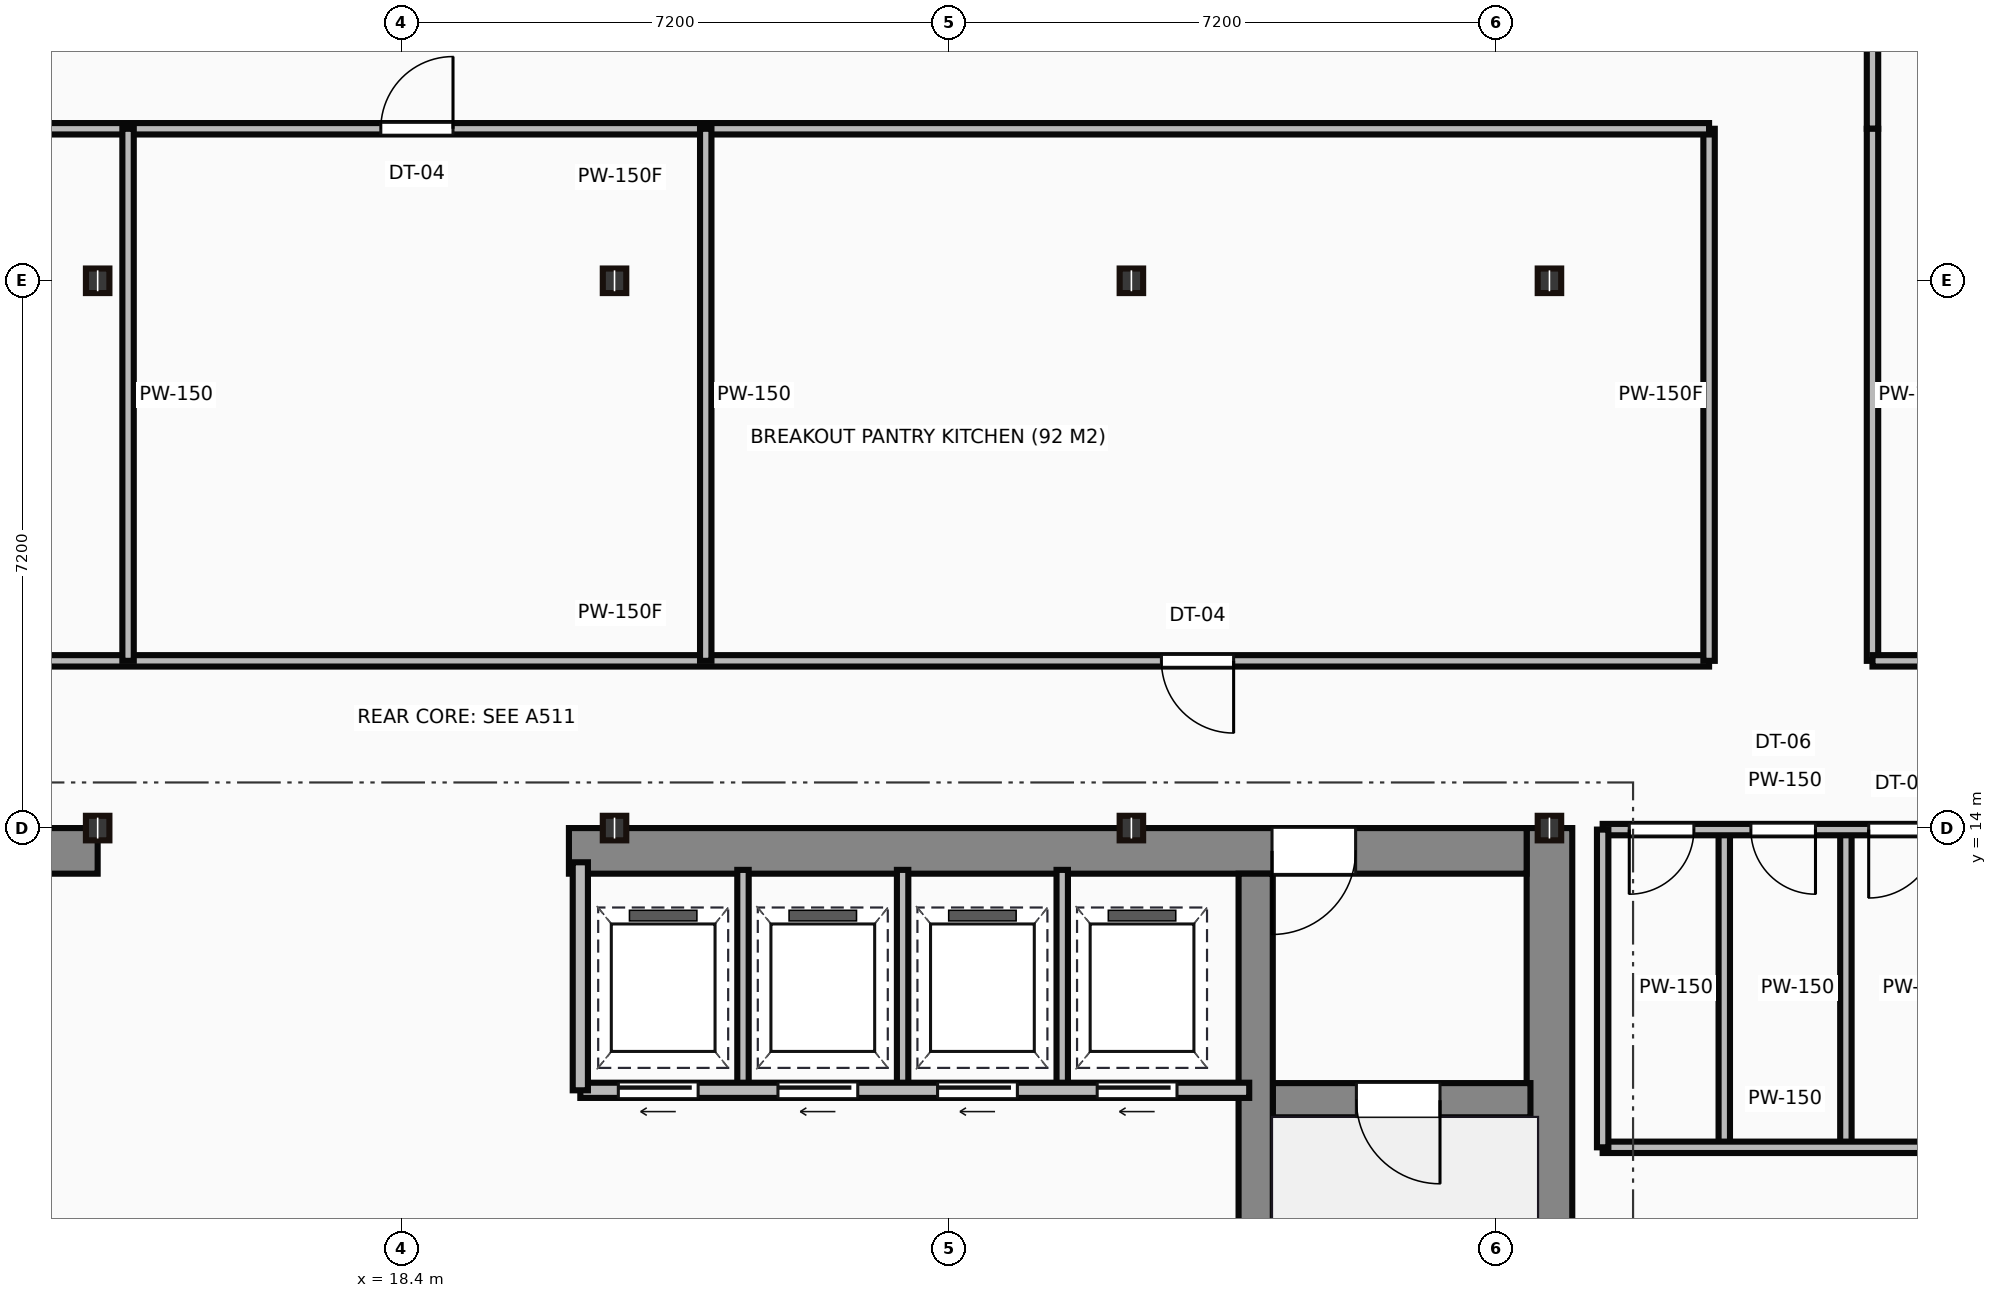
"""IFC4 building model, lengths in metres.
Left out: names, types, materials, properties, quantities, classifications, styles, units other than length and angle.
Written with IfcOpenShell. Run it as: python <this file> out.ifc"""

import sys

from ifc_helpers import new_model, si_unit, direction, frame, frame_2d, origin, origin_2d, place, context, subcontext, project, spatial, rectangle, i_section, extrude, source, transform, mapped, element, fill, save


model = new_model("IFC4")
c1 = context("Model", 3, precision=1e-05, world=origin(), true_north=direction((0.0, 1.0)))
c2 = subcontext(c1, "Body", "Model", "MODEL_VIEW")
j1 = project(units=[si_unit("LENGTHUNIT", "METRE"), si_unit("PLANEANGLEUNIT", "RADIAN")], contexts=[c1])
p1 = place(None, origin())
s1 = spatial("IfcSite", under=j1, at=p1, CompositionType="ELEMENT")
p2 = place(p1, origin())
s2 = spatial("IfcBuilding", under=s1, at=p2, CompositionType="ELEMENT")
p3 = place(p2, frame((0.0, 0.0, 273.4)))
s3 = spatial("IfcBuildingStorey", under=s2, at=p3, CompositionType="ELEMENT", Elevation=273.4)
m1 = source(origin(), c2, "Body", "SweptSolid", [
    extrude(rectangle(XDim=13.1, YDim=0.6, at=frame_2d((6.55, 0.0))), origin(), (0.0, 0.0, 1.0), 3.65),
])
p4 = place(p3, frame((33.5, 0.9, 0.0), z_axis=(0.0, 0.0, 1.0), x_axis=(0.0, 1.0, 0.0)))
e1 = element("IfcWall", 1, at=p4, inside=s3, PredefinedType="SHEAR", context=c2, shape_type="MappedRepresentation", body=[
    mapped(m1, transform((0.0, 0.0, 0.0))),
])
m2 = source(origin(), c2, "Body", "SweptSolid", [
    extrude(rectangle(XDim=9.1, YDim=0.6, at=frame_2d((4.55, 0.0))), origin(), (0.0, 0.0, 1.0), 3.65),
])
p5 = place(p3, frame((5.3, 13.7, 0.0), z_axis=(0.0, 0.0, 1.0), x_axis=(1.0, 0.0, 0.0)))
e2 = element("IfcWall", 2, at=p5, inside=s3, PredefinedType="SHEAR", context=c2, shape_type="MappedRepresentation", body=[
    mapped(m2, transform((0.0, 0.0, 0.0))),
])
p6 = place(p5, frame((4.1, 0.0, 0.0)))
e3 = element("IfcOpeningElement", 3, at=p6, cuts=e2, PredefinedType="OPENING", context=c2, shape_type="SweptSolid", body=[
    extrude(rectangle(XDim=1.1, YDim=2.15, at=frame_2d((0.55, 1.075))), frame((0.0, 0.31, 0.0), z_axis=(0.0, -1.0, 0.0), x_axis=(1.0, 0.0, 0.0)), (0.0, 0.0, 1.0), 0.62),
])
m3 = source(origin(), c2, "Body", "SweptSolid", [
    extrude(rectangle(XDim=12.6, YDim=0.6, at=frame_2d((6.3, 0.0))), origin(), (0.0, 0.0, 1.0), 3.65),
])
p7 = place(p3, frame((20.6, 13.7, 0.0), z_axis=(0.0, 0.0, 1.0), x_axis=(1.0, 0.0, 0.0)))
e4 = element("IfcWall", 4, at=p7, inside=s3, PredefinedType="SHEAR", context=c2, shape_type="MappedRepresentation", body=[
    mapped(m3, transform((0.0, 0.0, 0.0))),
])
p8 = place(p7, frame((9.25, 0.0, 0.0)))
e5 = element("IfcOpeningElement", 5, at=p8, cuts=e4, PredefinedType="OPENING", context=c2, shape_type="SweptSolid", body=[
    extrude(rectangle(XDim=1.1, YDim=2.15, at=frame_2d((0.55, 1.075))), frame((0.0, 0.31, 0.0), z_axis=(0.0, -1.0, 0.0), x_axis=(1.0, 0.0, 0.0)), (0.0, 0.0, 1.0), 0.62),
])
m4 = source(origin(), c2, "Body", "SweptSolid", [
    extrude(rectangle(XDim=12.5, YDim=0.45, at=frame_2d((6.25, 0.0))), origin(), (0.0, 0.0, 1.0), 3.65),
])
p9 = place(p3, frame((29.635, 0.9, 0.0), z_axis=(0.0, 0.0, 1.0), x_axis=(0.0, 1.0, 0.0)))
e6 = element("IfcWall", 6, at=p9, inside=s3, PredefinedType="SHEAR", context=c2, shape_type="MappedRepresentation", body=[
    mapped(m4, transform((0.0, 0.0, 0.0))),
])
m5 = source(origin(), c2, "Body", "SweptSolid", [
    extrude(rectangle(XDim=3.39, YDim=0.45, at=frame_2d((1.695, 0.0))), origin(), (0.0, 0.0, 1.0), 3.65),
])
p10 = place(p3, frame((29.86, 10.42, 0.0), z_axis=(0.0, 0.0, 1.0), x_axis=(1.0, 0.0, 0.0)))
e7 = element("IfcWall", 7, at=p10, inside=s3, PredefinedType="SHEAR", context=c2, shape_type="MappedRepresentation", body=[
    mapped(m5, transform((0.0, 0.0, 0.0))),
])
p11 = place(p10, frame((1.1, 0.0, 0.0)))
e8 = element("IfcOpeningElement", 8, at=p11, cuts=e7, PredefinedType="OPENING", context=c2, shape_type="SweptSolid", body=[
    extrude(rectangle(XDim=1.1, YDim=2.15, at=frame_2d((0.55, 1.075))), frame((0.0, 0.235, 0.0), z_axis=(0.0, -1.0, 0.0), x_axis=(1.0, 0.0, 0.0)), (0.0, 0.0, 1.0), 0.47),
])
m6 = source(origin(), c2, "Body", "SweptSolid", [
    extrude(i_section(OverallWidth=0.309, OverallDepth=0.323, WebThickness=0.014, FlangeThickness=0.023, at=origin_2d()), origin(), (0.0, 0.0, 1.0), 3.65),
])
for number, where, z_axis, x_axis in (
    (9, (14.4, 14.0, 0.0), (0.0, 0.0, 1.0), (1.0, 0.0, 0.0)),
    (10, (14.4, 21.2, 0.0), (0.0, 0.0, 1.0), (1.0, 0.0, 0.0)),
    (11, (21.2, 14.0, 0.0), (0.0, 0.0, 1.0), (1.0, 0.0, 0.0)),
    (12, (21.2, 21.2, 0.0), (0.0, 0.0, 1.0), (1.0, 0.0, 0.0)),
    (13, (28.0, 14.0, 0.0), (0.0, 0.0, 1.0), (1.0, 0.0, 0.0)),
    (14, (28.0, 21.2, 0.0), (0.0, 0.0, 1.0), (1.0, 0.0, 0.0)),
    (15, (33.5, 14.0, 0.0), (0.0, 0.0, 1.0), (1.0, 0.0, 0.0)),
    (16, (33.5, 21.2, 0.0), (0.0, 0.0, 1.0), (1.0, 0.0, 0.0)),
):
    element("IfcColumn", number, at=place(p3, frame(where, z_axis=z_axis, x_axis=x_axis)), inside=s3, PredefinedType="COLUMN", context=c2, shape_type="MappedRepresentation", body=[
        mapped(m6, transform((0.0, 0.0, 0.0))),
    ])
m7 = source(origin(), c2, "Body", "SweptSolid", [
    extrude(rectangle(XDim=8.8, YDim=0.2, at=frame_2d((4.4, 0.0))), origin(), (0.0, 0.0, 1.0), 3.4),
])
p12 = place(p3, frame((20.75, 10.55, 0.0), z_axis=(0.0, 0.0, 1.0), x_axis=(1.0, 0.0, 0.0)))
e17 = element("IfcWall", 17, at=p12, inside=s3, PredefinedType="PARTITIONING", context=c2, shape_type="MappedRepresentation", body=[
    mapped(m7, transform((0.0, 0.0, 0.0))),
])
p13 = place(p12, frame((0.5, 0.0, 0.0)))
e18 = element("IfcOpeningElement", 18, at=p13, cuts=e17, PredefinedType="OPENING", context=c2, shape_type="SweptSolid", body=[
    extrude(rectangle(XDim=1.05, YDim=2.15, at=frame_2d((0.525, 1.075))), frame((0.0, 0.11, 0.0), z_axis=(0.0, -1.0, 0.0), x_axis=(1.0, 0.0, 0.0)), (0.0, 0.0, 1.0), 0.22),
])
p14 = place(p12, frame((2.6, 0.0, 0.0)))
e19 = element("IfcOpeningElement", 19, at=p14, cuts=e17, PredefinedType="OPENING", context=c2, shape_type="SweptSolid", body=[
    extrude(rectangle(XDim=1.05, YDim=2.15, at=frame_2d((0.525, 1.075))), frame((0.0, 0.11, 0.0), z_axis=(0.0, -1.0, 0.0), x_axis=(1.0, 0.0, 0.0)), (0.0, 0.0, 1.0), 0.22),
])
p15 = place(p12, frame((4.7, 0.0, 0.0)))
e20 = element("IfcOpeningElement", 20, at=p15, cuts=e17, PredefinedType="OPENING", context=c2, shape_type="SweptSolid", body=[
    extrude(rectangle(XDim=1.05, YDim=2.15, at=frame_2d((0.525, 1.075))), frame((0.0, 0.11, 0.0), z_axis=(0.0, -1.0, 0.0), x_axis=(1.0, 0.0, 0.0)), (0.0, 0.0, 1.0), 0.22),
])
p16 = place(p12, frame((6.8, 0.0, 0.0)))
e21 = element("IfcOpeningElement", 21, at=p16, cuts=e17, PredefinedType="OPENING", context=c2, shape_type="SweptSolid", body=[
    extrude(rectangle(XDim=1.05, YDim=2.15, at=frame_2d((0.525, 1.075))), frame((0.0, 0.11, 0.0), z_axis=(0.0, -1.0, 0.0), x_axis=(1.0, 0.0, 0.0)), (0.0, 0.0, 1.0), 0.22),
])
m8 = source(origin(), c2, "Body", "SweptSolid", [
    extrude(rectangle(XDim=3.0, YDim=0.2, at=frame_2d((1.5, 0.0))), origin(), (0.0, 0.0, 1.0), 3.4),
])
p17 = place(p3, frame((20.75, 10.55, 0.0), z_axis=(0.0, 0.0, 1.0), x_axis=(0.0, 1.0, 0.0)))
e22 = element("IfcWall", 22, at=p17, inside=s3, PredefinedType="PARTITIONING", context=c2, shape_type="MappedRepresentation", body=[
    mapped(m8, transform((0.0, 0.0, 0.0))),
])
m9 = source(origin(), c2, "Body", "SweptSolid", [
    extrude(rectangle(XDim=2.85, YDim=0.15, at=frame_2d((1.425, 0.0))), origin(), (0.0, 0.0, 1.0), 3.4),
])
for number, where, z_axis, x_axis in (
    (23, (22.89, 10.6, 0.0), (0.0, 0.0, 1.0), (0.0, 1.0, 0.0)),
    (24, (24.99, 10.6, 0.0), (0.0, 0.0, 1.0), (0.0, 1.0, 0.0)),
    (25, (27.09, 10.6, 0.0), (0.0, 0.0, 1.0), (0.0, 1.0, 0.0)),
):
    element("IfcWall", number, at=place(p3, frame(where, z_axis=z_axis, x_axis=x_axis)), inside=s3, PredefinedType="PARTITIONING", context=c2, shape_type="MappedRepresentation", body=[
        mapped(m9, transform((0.0, 0.0, 0.0))),
    ])
m10 = source(origin(), c2, "Body", "SweptSolid", [
    extrude(rectangle(XDim=4.8, YDim=0.15, at=frame_2d((2.4, 0.0))), origin(), (0.0, 0.0, 1.0), 2.787),
])
p18 = place(p3, frame((34.2, 13.98, 0.0), z_axis=(0.0, 0.0, 1.0), x_axis=(1.0, 0.0, 0.0)))
e26 = element("IfcWall", 26, at=p18, inside=s3, PredefinedType="PARTITIONING", context=c2, shape_type="MappedRepresentation", body=[
    mapped(m10, transform((0.0, 0.0, 0.0))),
])
p19 = place(p18, frame((0.35, 0.0, 0.0)))
e27 = element("IfcOpeningElement", 27, at=p19, cuts=e26, PredefinedType="OPENING", context=c2, shape_type="SweptSolid", body=[
    extrude(rectangle(XDim=0.85, YDim=2.1, at=frame_2d((0.425, 1.05))), frame((0.0, 0.085, 0.0), z_axis=(0.0, -1.0, 0.0), x_axis=(1.0, 0.0, 0.0)), (0.0, 0.0, 1.0), 0.17),
])
p20 = place(p18, frame((1.95, 0.0, 0.0)))
e28 = element("IfcOpeningElement", 28, at=p20, cuts=e26, PredefinedType="OPENING", context=c2, shape_type="SweptSolid", body=[
    extrude(rectangle(XDim=0.85, YDim=2.1, at=frame_2d((0.425, 1.05))), frame((0.0, 0.085, 0.0), z_axis=(0.0, -1.0, 0.0), x_axis=(1.0, 0.0, 0.0)), (0.0, 0.0, 1.0), 0.17),
])
p21 = place(p18, frame((3.5, 0.0, 0.0)))
e29 = element("IfcOpeningElement", 29, at=p21, cuts=e26, PredefinedType="OPENING", context=c2, shape_type="SweptSolid", body=[
    extrude(rectangle(XDim=0.9, YDim=2.1, at=frame_2d((0.45, 1.05))), frame((0.0, 0.085, 0.0), z_axis=(0.0, -1.0, 0.0), x_axis=(1.0, 0.0, 0.0)), (0.0, 0.0, 1.0), 0.17),
])
m11 = source(origin(), c2, "Body", "SweptSolid", [
    extrude(rectangle(XDim=4.8, YDim=0.15, at=frame_2d((2.4, 0.0))), origin(), (0.0, 0.0, 1.0), 3.4),
])
p22 = place(p3, frame((34.2, 9.8, 0.0), z_axis=(0.0, 0.0, 1.0), x_axis=(1.0, 0.0, 0.0)))
e30 = element("IfcWall", 30, at=p22, inside=s3, PredefinedType="PARTITIONING", context=c2, shape_type="MappedRepresentation", body=[
    mapped(m11, transform((0.0, 0.0, 0.0))),
])
m12 = source(origin(), c2, "Body", "SweptSolid", [
    extrude(rectangle(XDim=4.18, YDim=0.15, at=frame_2d((2.09, 0.0))), origin(), (0.0, 0.0, 1.0), 3.4),
])
for number, where, z_axis, x_axis in (
    (31, (34.2, 9.8, 0.0), (0.0, 0.0, 1.0), (0.0, 1.0, 0.0)),
    (32, (35.8, 9.8, 0.0), (0.0, 0.0, 1.0), (0.0, 1.0, 0.0)),
    (33, (37.4, 9.8, 0.0), (0.0, 0.0, 1.0), (0.0, 1.0, 0.0)),
):
    element("IfcWall", number, at=place(p3, frame(where, z_axis=z_axis, x_axis=x_axis)), inside=s3, PredefinedType="PARTITIONING", context=c2, shape_type="MappedRepresentation", body=[
        mapped(m12, transform((0.0, 0.0, 0.0))),
    ])
m13 = source(origin(), c2, "Body", "SweptSolid", [
    extrude(rectangle(XDim=2.0, YDim=0.15, at=frame_2d((1.0, 0.0))), origin(), (0.0, 0.0, 1.0), 3.4),
])
p23 = place(p3, frame((37.75, 25.2, 0.0), z_axis=(0.0, 0.0, 1.0), x_axis=(0.0, -1.0, 0.0)))
e34 = element("IfcWall", 34, at=p23, inside=s3, PredefinedType="PARTITIONING", context=c2, shape_type="MappedRepresentation", body=[
    mapped(m13, transform((0.0, 0.0, 0.0))),
])
m14 = source(origin(), c2, "Body", "SweptSolid", [
    extrude(rectangle(XDim=7.0, YDim=0.15, at=frame_2d((3.5, 0.0))), origin(), (0.0, 0.0, 1.0), 3.4),
])
p24 = place(p3, frame((37.75, 23.2, 0.0), z_axis=(0.0, 0.0, 1.0), x_axis=(0.0, -1.0, 0.0)))
e35 = element("IfcWall", 35, at=p24, inside=s3, PredefinedType="PARTITIONING", context=c2, shape_type="MappedRepresentation", body=[
    mapped(m14, transform((0.0, 0.0, 0.0))),
])
m15 = source(origin(), c2, "Body", "SweptSolid", [
    extrude(rectangle(XDim=1.45, YDim=0.15, at=frame_2d((0.725, 0.0))), origin(), (0.0, 0.0, 1.0), 3.4),
])
p25 = place(p3, frame((37.75, 16.2, 0.0), z_axis=(0.0, 0.0, 1.0), x_axis=(1.0, 0.0, 0.0)))
e36 = element("IfcWall", 36, at=p25, inside=s3, PredefinedType="PARTITIONING", context=c2, shape_type="MappedRepresentation", body=[
    mapped(m15, transform((0.0, 0.0, 0.0))),
])
m16 = source(origin(), c2, "Body", "SweptSolid", [
    extrude(rectangle(XDim=28.65, YDim=0.15, at=frame_2d((14.325, 0.0))), origin(), (0.0, 0.0, 1.0), 3.4),
])
p26 = place(p3, frame((6.95, 16.2, 0.0), z_axis=(0.0, 0.0, 1.0), x_axis=(1.0, 0.0, 0.0)))
e37 = element("IfcWall", 37, at=p26, inside=s3, PredefinedType="PARTITIONING", context=c2, shape_type="MappedRepresentation", body=[
    mapped(m16, transform((0.0, 0.0, 0.0))),
])
p27 = place(p26, frame((21.445, 0.0, 0.0)))
e38 = element("IfcOpeningElement", 38, at=p27, cuts=e37, PredefinedType="OPENING", context=c2, shape_type="SweptSolid", body=[
    extrude(rectangle(XDim=0.95, YDim=2.15, at=frame_2d((0.475, 1.075))), frame((0.0, 0.085, 0.0), z_axis=(0.0, -1.0, 0.0), x_axis=(1.0, 0.0, 0.0)), (0.0, 0.0, 1.0), 0.17),
])
p28 = place(p3, frame((35.6, 16.2, 0.0), z_axis=(0.0, 0.0, 1.0), x_axis=(0.0, 1.0, 0.0)))
e39 = element("IfcWall", 39, at=p28, inside=s3, PredefinedType="PARTITIONING", context=c2, shape_type="MappedRepresentation", body=[
    mapped(m14, transform((0.0, 0.0, 0.0))),
])
p29 = place(p3, frame((35.6, 23.2, 0.0), z_axis=(0.0, 0.0, 1.0), x_axis=(-1.0, 0.0, 0.0)))
e40 = element("IfcWall", 40, at=p29, inside=s3, PredefinedType="PARTITIONING", context=c2, shape_type="MappedRepresentation", body=[
    mapped(m16, transform((0.0, 0.0, 0.0))),
])
p30 = place(p29, frame((24.12, 0.0, 0.0)))
e41 = element("IfcOpeningElement", 41, at=p30, cuts=e40, PredefinedType="OPENING", context=c2, shape_type="SweptSolid", body=[
    extrude(rectangle(XDim=0.95, YDim=2.15, at=frame_2d((0.475, 1.075))), frame((0.0, 0.085, 0.0), z_axis=(0.0, -1.0, 0.0), x_axis=(1.0, 0.0, 0.0)), (0.0, 0.0, 1.0), 0.17),
])
p31 = place(p29, frame((16.525, 0.0, 0.0)))
e42 = element("IfcOpeningElement", 42, at=p31, cuts=e40, PredefinedType="OPENING", context=c2, shape_type="SweptSolid", body=[
    extrude(rectangle(XDim=0.95, YDim=2.15, at=frame_2d((0.475, 1.075))), frame((0.0, 0.085, 0.0), z_axis=(0.0, -1.0, 0.0), x_axis=(1.0, 0.0, 0.0)), (0.0, 0.0, 1.0), 0.17),
])
for number, where, z_axis, x_axis in (
    (43, (14.8, 23.2, 0.0), (0.0, 0.0, 1.0), (0.0, -1.0, 0.0)),
    (44, (22.4, 23.2, 0.0), (0.0, 0.0, 1.0), (0.0, -1.0, 0.0)),
):
    element("IfcWall", number, at=place(p3, frame(where, z_axis=z_axis, x_axis=x_axis)), inside=s3, PredefinedType="PARTITIONING", context=c2, shape_type="MappedRepresentation", body=[
        mapped(m14, transform((0.0, 0.0, 0.0))),
    ])
m17 = source(origin(), c2, "Body", "SweptSolid", [
    extrude(rectangle(XDim=1.1, YDim=2.15, at=frame_2d((0.55, 1.075))), frame((0.0, 0.025, 0.0), z_axis=(0.0, -1.0, 0.0), x_axis=(1.0, 0.0, 0.0)), (0.0, 0.0, 1.0), 0.05),
])
p32 = place(p11, frame((1.1, 0.0, 0.0), z_axis=(0.0, 0.0, 1.0), x_axis=(-1.0, 0.0, 0.0)))
e45 = element("IfcDoor", 45, at=p32, inside=s3, OperationType="SINGLE_SWING_RIGHT", PredefinedType="DOOR", context=c2, shape_type="MappedRepresentation", body=[
    mapped(m17, transform((0.0, 0.0, 0.0))),
])
fill(e8, e45)
p33 = place(p8, origin())
e46 = element("IfcDoor", 46, at=p33, inside=s3, OperationType="SINGLE_SWING_LEFT", PredefinedType="DOOR", context=c2, shape_type="MappedRepresentation", body=[
    mapped(m17, transform((0.0, 0.0, 0.0))),
])
fill(e5, e46)
m18 = source(origin(), c2, "Body", "SweptSolid", [
    extrude(rectangle(XDim=1.05, YDim=2.15, at=frame_2d((0.525, 1.075))), frame((0.0, 0.025, 0.0), z_axis=(0.0, -1.0, 0.0), x_axis=(1.0, 0.0, 0.0)), (0.0, 0.0, 1.0), 0.05),
])
p34 = place(p13, frame((1.05, 0.0, 0.0), z_axis=(0.0, 0.0, 1.0), x_axis=(-1.0, 0.0, 0.0)))
e47 = element("IfcDoor", 47, at=p34, inside=s3, OperationType="SLIDING_TO_LEFT", PredefinedType="DOOR", context=c2, shape_type="MappedRepresentation", body=[
    mapped(m18, transform((0.0, 0.0, 0.0))),
])
fill(e18, e47)
p35 = place(p14, frame((1.05, 0.0, 0.0), z_axis=(0.0, 0.0, 1.0), x_axis=(-1.0, 0.0, 0.0)))
e48 = element("IfcDoor", 48, at=p35, inside=s3, OperationType="SLIDING_TO_LEFT", PredefinedType="DOOR", context=c2, shape_type="MappedRepresentation", body=[
    mapped(m18, transform((0.0, 0.0, 0.0))),
])
fill(e19, e48)
p36 = place(p15, frame((1.05, 0.0, 0.0), z_axis=(0.0, 0.0, 1.0), x_axis=(-1.0, 0.0, 0.0)))
e49 = element("IfcDoor", 49, at=p36, inside=s3, OperationType="SLIDING_TO_LEFT", PredefinedType="DOOR", context=c2, shape_type="MappedRepresentation", body=[
    mapped(m18, transform((0.0, 0.0, 0.0))),
])
fill(e20, e49)
p37 = place(p16, frame((1.05, 0.0, 0.0), z_axis=(0.0, 0.0, 1.0), x_axis=(-1.0, 0.0, 0.0)))
e50 = element("IfcDoor", 50, at=p37, inside=s3, OperationType="SLIDING_TO_LEFT", PredefinedType="DOOR", context=c2, shape_type="MappedRepresentation", body=[
    mapped(m18, transform((0.0, 0.0, 0.0))),
])
fill(e21, e50)
m19 = source(origin(), c2, "Body", "SweptSolid", [
    extrude(rectangle(XDim=0.85, YDim=2.1, at=frame_2d((0.425, 1.05))), frame((0.0, 0.025, 0.0), z_axis=(0.0, -1.0, 0.0), x_axis=(1.0, 0.0, 0.0)), (0.0, 0.0, 1.0), 0.05),
])
p38 = place(p19, frame((0.85, 0.0, 0.0), z_axis=(0.0, 0.0, 1.0), x_axis=(-1.0, 0.0, 0.0)))
e51 = element("IfcDoor", 51, at=p38, inside=s3, OperationType="SINGLE_SWING_LEFT", PredefinedType="DOOR", context=c2, shape_type="MappedRepresentation", body=[
    mapped(m19, transform((0.0, 0.0, 0.0))),
])
fill(e27, e51)
p39 = place(p20, frame((0.85, 0.0, 0.0), z_axis=(0.0, 0.0, 1.0), x_axis=(-1.0, 0.0, 0.0)))
e52 = element("IfcDoor", 52, at=p39, inside=s3, OperationType="SINGLE_SWING_RIGHT", PredefinedType="DOOR", context=c2, shape_type="MappedRepresentation", body=[
    mapped(m19, transform((0.0, 0.0, 0.0))),
])
fill(e28, e52)
m20 = source(origin(), c2, "Body", "SweptSolid", [
    extrude(rectangle(XDim=0.9, YDim=2.1, at=frame_2d((0.45, 1.05))), frame((0.0, 0.025, 0.0), z_axis=(0.0, -1.0, 0.0), x_axis=(1.0, 0.0, 0.0)), (0.0, 0.0, 1.0), 0.05),
])
p40 = place(p21, frame((0.9, 0.0, 0.0), z_axis=(0.0, 0.0, 1.0), x_axis=(-1.0, 0.0, 0.0)))
e53 = element("IfcDoor", 53, at=p40, inside=s3, OperationType="SINGLE_SWING_LEFT", PredefinedType="DOOR", context=c2, shape_type="MappedRepresentation", body=[
    mapped(m20, transform((0.0, 0.0, 0.0))),
])
fill(e29, e53)
m21 = source(origin(), c2, "Body", "SweptSolid", [
    extrude(rectangle(XDim=0.95, YDim=2.15, at=frame_2d((0.475, 1.075))), frame((0.0, 0.025, 0.0), z_axis=(0.0, -1.0, 0.0), x_axis=(1.0, 0.0, 0.0)), (0.0, 0.0, 1.0), 0.05),
])
p41 = place(p31, origin())
e54 = element("IfcDoor", 54, at=p41, inside=s3, OperationType="SINGLE_SWING_LEFT", PredefinedType="DOOR", context=c2, shape_type="MappedRepresentation", body=[
    mapped(m21, transform((0.0, 0.0, 0.0))),
])
fill(e42, e54)
p42 = place(p27, origin())
e55 = element("IfcDoor", 55, at=p42, inside=s3, OperationType="SINGLE_SWING_RIGHT", PredefinedType="DOOR", context=c2, shape_type="MappedRepresentation", body=[
    mapped(m21, transform((0.0, 0.0, 0.0))),
])
fill(e38, e55)
save(model, sys.argv[1])
